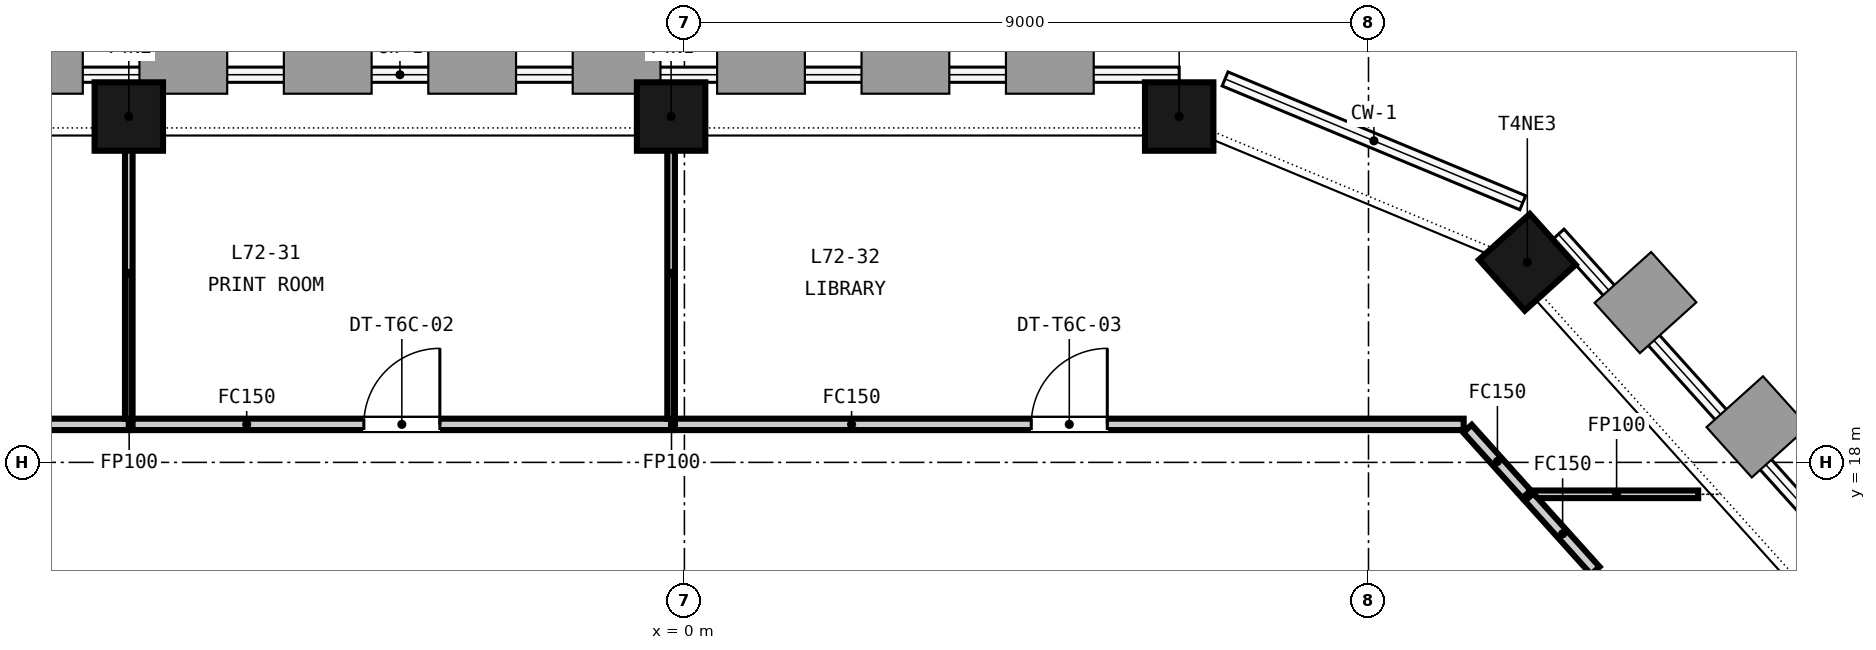
"""IFC4 building model, lengths in metres.
Left out: names, types, materials, properties, quantities, classifications, styles, units other than length and angle.
Written with IfcOpenShell. Run it as: python <this file> out.ifc"""

import sys

from ifc_helpers import new_model, si_unit, direction, frame, frame_2d, origin, origin_2d, place, context, subcontext, project, spatial, rectangle, extrude, element, fill, save


model = new_model("IFC4")
c1 = context("Model", 3, precision=1e-05, world=origin(), true_north=direction((0.0, 1.0)))
c2 = subcontext(c1, "Body", "Model", "MODEL_VIEW")
j1 = project(units=[si_unit("LENGTHUNIT", "METRE"), si_unit("PLANEANGLEUNIT", "RADIAN")], contexts=[c1])
p1 = place(None, origin())
s1 = spatial("IfcSite", under=j1, at=p1, CompositionType="ELEMENT")
p2 = place(p1, origin())
s2 = spatial("IfcBuilding", under=s1, at=p2, CompositionType="ELEMENT")
p3 = place(p2, frame((0.0, 0.0, 282.85)))
s3 = spatial("IfcBuildingStorey", under=s2, at=p3, CompositionType="ELEMENT", Elevation=282.85)
for number, where, z_axis, x_axis in (
    (1, (6.51, 22.55, -0.15), (0.0, 0.0, 1.0), (-1.0, 0.0, 0.0)),
    (2, (-0.175, 22.55, -0.15), (0.0, 0.0, 1.0), (-1.0, 0.0, 0.0)),
    (3, (-7.31, 22.55, -0.15), (0.0, 0.0, 1.0), (-1.0, 0.0, 0.0)),
    (4, (11.089, 20.633, -0.15), (0.0, 0.0, 1.0), (-0.669, 0.743, 0.0)),
):
    element("IfcColumn", number, at=place(p3, frame(where, z_axis=z_axis, x_axis=x_axis)), inside=s3, PredefinedType="COLUMN", context=c2, shape_type="SweptSolid", body=[
        extrude(rectangle(XDim=0.9, YDim=0.9, at=origin_2d()), origin(), (0.0, 0.0, 1.0), 3.65),
    ])
p4 = place(p3, frame((-14.925, 18.5, 0.0), z_axis=(0.0, 0.0, 1.0), x_axis=(1.0, 0.0, 0.0)))
e5 = element("IfcWall", 5, at=p4, inside=s3, PredefinedType="PARTITIONING", context=c2, shape_type="SweptSolid", body=[
    extrude(rectangle(XDim=7.615, YDim=0.15, at=frame_2d((3.808, 0.0))), origin(), (0.0, 0.0, 1.0), 2.75),
])
p5 = place(p4, frame((3.308, 0.0, 0.0)))
e6 = element("IfcOpeningElement", 6, at=p5, cuts=e5, PredefinedType="OPENING", context=c2, shape_type="SweptSolid", body=[
    extrude(rectangle(XDim=1.0, YDim=2.1, at=frame_2d((0.5, 1.05))), frame((0.0, 0.085, 0.0), z_axis=(0.0, -1.0, 0.0), x_axis=(1.0, 0.0, 0.0)), (0.0, 0.0, 1.0), 0.17),
])
p6 = place(p3, frame((-7.31, 18.575, 0.0), z_axis=(0.0, 0.0, 1.0), x_axis=(0.0, 1.0, 0.0)))
e7 = element("IfcWall", 7, at=p6, inside=s3, PredefinedType="PARTITIONING", context=c2, shape_type="SweptSolid", body=[
    extrude(rectangle(XDim=3.825, YDim=0.1, at=frame_2d((1.913, 0.0))), origin(), (0.0, 0.0, 1.0), 2.75),
])
p7 = place(p3, frame((-7.26, 18.5, 0.0), z_axis=(0.0, 0.0, 1.0), x_axis=(1.0, 0.0, 0.0)))
e8 = element("IfcWall", 8, at=p7, inside=s3, PredefinedType="PARTITIONING", context=c2, shape_type="SweptSolid", body=[
    extrude(rectangle(XDim=7.085, YDim=0.15, at=frame_2d((3.542, 0.0))), origin(), (0.0, 0.0, 1.0), 2.75),
])
p8 = place(p7, frame((3.042, 0.0, 0.0)))
e9 = element("IfcOpeningElement", 9, at=p8, cuts=e8, PredefinedType="OPENING", context=c2, shape_type="SweptSolid", body=[
    extrude(rectangle(XDim=1.0, YDim=2.1, at=frame_2d((0.5, 1.05))), frame((0.0, 0.085, 0.0), z_axis=(0.0, -1.0, 0.0), x_axis=(1.0, 0.0, 0.0)), (0.0, 0.0, 1.0), 0.17),
])
p9 = place(p3, frame((-0.175, 18.575, 0.0), z_axis=(0.0, 0.0, 1.0), x_axis=(0.0, 1.0, 0.0)))
e10 = element("IfcWall", 10, at=p9, inside=s3, PredefinedType="PARTITIONING", context=c2, shape_type="SweptSolid", body=[
    extrude(rectangle(XDim=3.825, YDim=0.1, at=frame_2d((1.913, 0.0))), origin(), (0.0, 0.0, 1.0), 2.75),
])
p10 = place(p3, frame((-0.125, 18.5, 0.0), z_axis=(0.0, 0.0, 1.0), x_axis=(1.0, 0.0, 0.0)))
e11 = element("IfcWall", 11, at=p10, inside=s3, PredefinedType="PARTITIONING", context=c2, shape_type="SweptSolid", body=[
    extrude(rectangle(XDim=10.377, YDim=0.15, at=frame_2d((5.188, 0.0))), origin(), (0.0, 0.0, 1.0), 2.75),
])
p11 = place(p10, frame((4.688, 0.0, 0.0)))
e12 = element("IfcOpeningElement", 12, at=p11, cuts=e11, PredefinedType="OPENING", context=c2, shape_type="SweptSolid", body=[
    extrude(rectangle(XDim=1.0, YDim=2.1, at=frame_2d((0.5, 1.05))), frame((0.0, 0.085, 0.0), z_axis=(0.0, -1.0, 0.0), x_axis=(1.0, 0.0, 0.0)), (0.0, 0.0, 1.0), 0.17),
])
p12 = place(p3, frame((10.302, 18.444, 0.0), z_axis=(0.0, 0.0, 1.0), x_axis=(0.668964731622, -0.743294146247, 0.0)))
e13 = element("IfcWall", 13, at=p12, inside=s3, PredefinedType="PARTITIONING", context=c2, shape_type="SweptSolid", body=[
    extrude(rectangle(XDim=1.163, YDim=0.15, at=frame_2d((0.582, 0.0))), origin(), (0.0, 0.0, 1.0), 2.75),
])
p13 = place(p3, frame((11.181, 17.58, 0.0), z_axis=(0.0, 0.0, 1.0), x_axis=(1.0, 0.0, 0.0)))
e14 = element("IfcWall", 14, at=p13, inside=s3, PredefinedType="PARTITIONING", context=c2, shape_type="SweptSolid", body=[
    extrude(rectangle(XDim=2.156, YDim=0.1, at=frame_2d((1.078, 0.0))), origin(), (0.0, 0.0, 1.0), 2.75),
])
p14 = place(p3, frame((11.114, 17.543, 0.0), z_axis=(0.0, 0.0, 1.0), x_axis=(0.669172057426, -0.743107500675, 0.0)))
e15 = element("IfcWall", 15, at=p14, inside=s3, PredefinedType="PARTITIONING", context=c2, shape_type="SweptSolid", body=[
    extrude(rectangle(XDim=1.301, YDim=0.15, at=frame_2d((0.65, 0.0))), origin(), (0.0, 0.0, 1.0), 2.75),
])
p15 = place(p8, origin())
e16 = element("IfcDoor", 16, at=p15, inside=s3, OperationType="SINGLE_SWING_RIGHT", PredefinedType="DOOR", context=c2, shape_type="SweptSolid", body=[
    extrude(rectangle(XDim=1.0, YDim=2.1, at=frame_2d((0.5, 1.05))), frame((0.0, 0.025, 0.0), z_axis=(0.0, -1.0, 0.0), x_axis=(1.0, 0.0, 0.0)), (0.0, 0.0, 1.0), 0.05),
])
fill(e9, e16)
p16 = place(p11, origin())
e17 = element("IfcDoor", 17, at=p16, inside=s3, OperationType="SINGLE_SWING_RIGHT", PredefinedType="DOOR", context=c2, shape_type="SweptSolid", body=[
    extrude(rectangle(XDim=1.0, YDim=2.1, at=frame_2d((0.5, 1.05))), frame((0.0, 0.025, 0.0), z_axis=(0.0, -1.0, 0.0), x_axis=(1.0, 0.0, 0.0)), (0.0, 0.0, 1.0), 0.05),
])
fill(e12, e17)
save(model, sys.argv[1])
